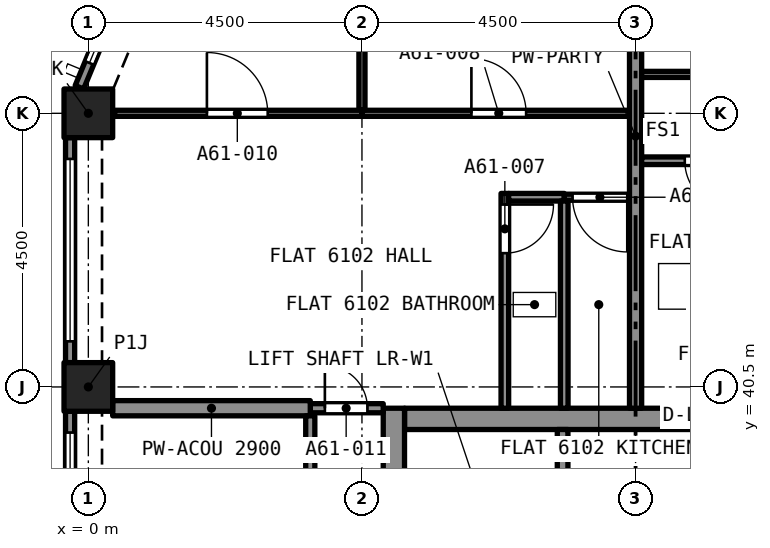
"""IFC4 building model, lengths in metres.
Left out: names, types, materials, properties, quantities, classifications, styles, units other than length and angle.
Written with IfcOpenShell. Run it as: python <this file> out.ifc"""

import sys

from ifc_helpers import new_model, si_unit, direction, frame, frame_2d, origin, origin_2d, place, context, subcontext, project, spatial, rectangle, extrude, element, fill, save


model = new_model("IFC4")
c1 = context("Model", 3, precision=1e-05, world=origin(), true_north=direction((0.0, 1.0)))
c2 = subcontext(c1, "Body", "Model", "MODEL_VIEW")
j1 = project(units=[si_unit("LENGTHUNIT", "METRE"), si_unit("PLANEANGLEUNIT", "RADIAN")], contexts=[c1])
p1 = place(None, origin())
s1 = spatial("IfcSite", under=j1, at=p1, CompositionType="ELEMENT")
p2 = place(p1, origin())
s2 = spatial("IfcBuilding", under=s1, at=p2, CompositionType="ELEMENT")
p3 = place(p2, frame((0.0, 0.0, 219.695)))
s3 = spatial("IfcBuildingStorey", under=s2, at=p3, CompositionType="ELEMENT", Elevation=219.695)
for number, where, z_axis, x_axis in (
    (1, (0.0, 40.5, 0.0), (0.0, 0.0, 1.0), (1.0, 0.0, 0.0)),
    (2, (0.0, 45.0, 0.0), (0.0, 0.0, 1.0), (1.0, 0.0, 0.0)),
):
    element("IfcColumn", number, at=place(p3, frame(where, z_axis=z_axis, x_axis=x_axis)), inside=s3, PredefinedType="COLUMN", context=c2, shape_type="SweptSolid", body=[
        extrude(rectangle(XDim=0.8, YDim=0.8, at=origin_2d()), origin(), (0.0, 0.0, 1.0), 3.2),
    ])
p4 = place(p3, frame((5.2, 39.975, 0.0), z_axis=(0.0, 0.0, 1.0), x_axis=(1.0, 0.0, 0.0)))
e3 = element("IfcWall", 3, at=p4, inside=s3, PredefinedType="SOLIDWALL", context=c2, shape_type="SweptSolid", body=[
    extrude(rectangle(XDim=7.6, YDim=0.35, at=frame_2d((3.8, 0.0))), origin(), (0.0, 0.0, 1.0), 3.2),
])
p5 = place(p3, frame((5.025, 27.35, 0.0), z_axis=(0.0, 0.0, 1.0), x_axis=(0.0, 1.0, 0.0)))
e4 = element("IfcWall", 4, at=p5, inside=s3, PredefinedType="SOLIDWALL", context=c2, shape_type="SweptSolid", body=[
    extrude(rectangle(XDim=12.8, YDim=0.35, at=frame_2d((6.4, 0.0))), origin(), (0.0, 0.0, 1.0), 3.2),
])
p6 = place(p5, frame((8.6, 0.0, 0.0)))
e5 = element("IfcOpeningElement", 5, at=p6, cuts=e4, PredefinedType="OPENING", context=c2, shape_type="SweptSolid", body=[
    extrude(rectangle(XDim=1.2, YDim=2.1, at=frame_2d((0.6, 1.05))), frame((0.0, 0.185, 0.0), z_axis=(0.0, -1.0, 0.0), x_axis=(1.0, 0.0, 0.0)), (0.0, 0.0, 1.0), 0.37),
])
p7 = place(p3, frame((-0.147, 45.429, 0.0), z_axis=(0.0, 0.0, 1.0), x_axis=(0.382669406082, 0.923885342263, 0.0)))
e6 = element("IfcWall", 6, at=p7, inside=s3, PredefinedType="SOLIDWALL", context=c2, shape_type="SweptSolid", body=[
    extrude(rectangle(XDim=2.602, YDim=0.15, at=frame_2d((1.301, 0.0))), origin(), (0.0, 0.0, 1.0), 3.2),
])
p8 = place(p7, frame((0.432, 0.0, 0.45)))
e7 = element("IfcOpeningElement", 7, at=p8, cuts=e6, PredefinedType="OPENING", context=c2, shape_type="SweptSolid", body=[
    extrude(rectangle(XDim=1.9, YDim=1.95, at=frame_2d((0.95, 0.975))), frame((0.0, 0.085, 0.0), z_axis=(0.0, -1.0, 0.0), x_axis=(1.0, 0.0, 0.0)), (0.0, 0.0, 1.0), 0.17),
])
p9 = place(p3, frame((-0.3, 40.9, 0.0), z_axis=(0.0, 0.0, 1.0), x_axis=(0.0, 1.0, 0.0)))
e8 = element("IfcWall", 8, at=p9, inside=s3, PredefinedType="SOLIDWALL", context=c2, shape_type="SweptSolid", body=[
    extrude(rectangle(XDim=3.7, YDim=0.15, at=frame_2d((1.85, 0.0))), origin(), (0.0, 0.0, 1.0), 3.2),
])
p10 = place(p9, frame((0.35, 0.0, 0.45)))
e9 = element("IfcOpeningElement", 9, at=p10, cuts=e8, PredefinedType="OPENING", context=c2, shape_type="SweptSolid", body=[
    extrude(rectangle(XDim=3.0, YDim=1.95, at=frame_2d((1.5, 0.975))), frame((0.0, 0.085, 0.0), z_axis=(0.0, -1.0, 0.0), x_axis=(1.0, 0.0, 0.0)), (0.0, 0.0, 1.0), 0.17),
])
p11 = place(p3, frame((-0.3, 36.4, 0.0), z_axis=(0.0, 0.0, 1.0), x_axis=(0.0, 1.0, 0.0)))
e10 = element("IfcWall", 10, at=p11, inside=s3, PredefinedType="SOLIDWALL", context=c2, shape_type="SweptSolid", body=[
    extrude(rectangle(XDim=3.7, YDim=0.15, at=frame_2d((1.85, 0.0))), origin(), (0.0, 0.0, 1.0), 3.2),
])
p12 = place(p11, frame((0.35, 0.0, 0.45)))
e11 = element("IfcOpeningElement", 11, at=p12, cuts=e10, PredefinedType="OPENING", context=c2, shape_type="SweptSolid", body=[
    extrude(rectangle(XDim=3.0, YDim=1.95, at=frame_2d((1.5, 0.975))), frame((0.0, 0.085, 0.0), z_axis=(0.0, -1.0, 0.0), x_axis=(1.0, 0.0, 0.0)), (0.0, 0.0, 1.0), 0.17),
])
p13 = place(p3, frame((6.85, 43.683, 0.0), z_axis=(0.0, 0.0, 1.0), x_axis=(0.0, -1.0, 0.0)))
e12 = element("IfcWall", 12, at=p13, inside=s3, PredefinedType="PARTITIONING", context=c2, shape_type="SweptSolid", body=[
    extrude(rectangle(XDim=3.533, YDim=0.125, at=frame_2d((1.766, 0.0))), origin(), (0.0, 0.0, 1.0), 2.9),
])
p14 = place(p13, frame((0.183, 0.0, 0.0)))
e13 = element("IfcOpeningElement", 13, at=p14, cuts=e12, PredefinedType="OPENING", context=c2, shape_type="SweptSolid", body=[
    extrude(rectangle(XDim=0.8, YDim=2.1, at=frame_2d((0.4, 1.05))), frame((0.0, 0.073, 0.0), z_axis=(0.0, -1.0, 0.0), x_axis=(1.0, 0.0, 0.0)), (0.0, 0.0, 1.0), 0.145),
])
p15 = place(p3, frame((6.913, 43.62, 0.0), z_axis=(0.0, 0.0, 1.0), x_axis=(1.0, 0.0, 0.0)))
e14 = element("IfcWall", 14, at=p15, inside=s3, PredefinedType="PARTITIONING", context=c2, shape_type="SweptSolid", body=[
    extrude(rectangle(XDim=0.915, YDim=0.125, at=frame_2d((0.458, 0.0))), origin(), (0.0, 0.0, 1.0), 2.9),
])
p16 = place(p3, frame((7.827, 40.15, 0.0), z_axis=(0.0, 0.0, 1.0), x_axis=(0.0, 1.0, 0.0)))
e15 = element("IfcWall", 15, at=p16, inside=s3, PredefinedType="PARTITIONING", context=c2, shape_type="SweptSolid", body=[
    extrude(rectangle(XDim=3.408, YDim=0.125, at=frame_2d((1.704, 0.0))), origin(), (0.0, 0.0, 1.0), 2.9),
])
p17 = place(p3, frame((4.5, 45.0, 0.0), z_axis=(0.0, 0.0, 1.0), x_axis=(1.0, 0.0, 0.0)))
e16 = element("IfcWall", 16, at=p17, inside=s3, PredefinedType="PARTITIONING", context=c2, shape_type="SweptSolid", body=[
    extrude(rectangle(XDim=4.4, YDim=0.1, at=frame_2d((2.2, 0.0))), origin(), (0.0, 0.0, 1.0), 2.9),
])
p18 = place(p17, frame((1.8, 0.0, 0.0)))
e17 = element("IfcOpeningElement", 17, at=p18, cuts=e16, PredefinedType="OPENING", context=c2, shape_type="SweptSolid", body=[
    extrude(rectangle(XDim=0.9, YDim=2.1, at=frame_2d((0.45, 1.05))), frame((0.0, 0.06, 0.0), z_axis=(0.0, -1.0, 0.0), x_axis=(1.0, 0.0, 0.0)), (0.0, 0.0, 1.0), 0.12),
])
p19 = place(p3, frame((4.5, 45.05, 0.0), z_axis=(0.0, 0.0, 1.0), x_axis=(0.0, 1.0, 0.0)))
e18 = element("IfcWall", 18, at=p19, inside=s3, PredefinedType="PARTITIONING", context=c2, shape_type="SweptSolid", body=[
    extrude(rectangle(XDim=4.017, YDim=0.1, at=frame_2d((2.009, 0.0))), origin(), (0.0, 0.0, 1.0), 2.9),
])
p20 = place(p3, frame((8.9, 43.62, 0.0), z_axis=(0.0, 0.0, 1.0), x_axis=(-1.0, 0.0, 0.0)))
e19 = element("IfcWall", 19, at=p20, inside=s3, PredefinedType="PARTITIONING", context=c2, shape_type="SweptSolid", body=[
    extrude(rectangle(XDim=1.073, YDim=0.1, at=frame_2d((0.536, 0.0))), origin(), (0.0, 0.0, 1.0), 2.9),
])
p21 = place(p20, frame((0.036, 0.0, 0.0)))
e20 = element("IfcOpeningElement", 20, at=p21, cuts=e19, PredefinedType="OPENING", context=c2, shape_type="SweptSolid", body=[
    extrude(rectangle(XDim=0.9, YDim=2.1, at=frame_2d((0.45, 1.05))), frame((0.0, 0.06, 0.0), z_axis=(0.0, -1.0, 0.0), x_axis=(1.0, 0.0, 0.0)), (0.0, 0.0, 1.0), 0.12),
])
p22 = place(p3, frame((0.433, 45.0, 0.0), z_axis=(0.0, 0.0, 1.0), x_axis=(1.0, 0.0, 0.0)))
e21 = element("IfcWall", 21, at=p22, inside=s3, PredefinedType="PARTITIONING", context=c2, shape_type="SweptSolid", body=[
    extrude(rectangle(XDim=4.067, YDim=0.1, at=frame_2d((2.034, 0.0))), origin(), (0.0, 0.0, 1.0), 2.9),
])
p23 = place(p22, frame((1.517, 0.0, 0.0)))
e22 = element("IfcOpeningElement", 22, at=p23, cuts=e21, PredefinedType="OPENING", context=c2, shape_type="SweptSolid", body=[
    extrude(rectangle(XDim=1.0, YDim=2.1, at=frame_2d((0.5, 1.05))), frame((0.0, 0.06, 0.0), z_axis=(0.0, -1.0, 0.0), x_axis=(1.0, 0.0, 0.0)), (0.0, 0.0, 1.0), 0.12),
])
p24 = place(p3, frame((3.65, 40.15, 0.0), z_axis=(0.0, 0.0, 1.0), x_axis=(1.0, 0.0, 0.0)))
e23 = element("IfcWall", 23, at=p24, inside=s3, PredefinedType="PARTITIONING", context=c2, shape_type="SweptSolid", body=[
    extrude(rectangle(XDim=1.2, YDim=0.15, at=frame_2d((0.6, 0.0))), origin(), (0.0, 0.0, 1.0), 2.9),
])
p25 = place(p24, frame((0.24, 0.0, 0.0)))
e24 = element("IfcOpeningElement", 24, at=p25, cuts=e23, PredefinedType="OPENING", context=c2, shape_type="SweptSolid", body=[
    extrude(rectangle(XDim=0.7, YDim=2.1, at=frame_2d((0.35, 1.05))), frame((0.0, 0.085, 0.0), z_axis=(0.0, -1.0, 0.0), x_axis=(1.0, 0.0, 0.0)), (0.0, 0.0, 1.0), 0.17),
])
p26 = place(p3, frame((0.4, 40.15, 0.0), z_axis=(0.0, 0.0, 1.0), x_axis=(1.0, 0.0, 0.0)))
e25 = element("IfcWall", 25, at=p26, inside=s3, PredefinedType="PARTITIONING", context=c2, shape_type="SweptSolid", body=[
    extrude(rectangle(XDim=3.25, YDim=0.25, at=frame_2d((1.625, 0.0))), origin(), (0.0, 0.0, 1.0), 2.9),
])
p27 = place(p3, frame((9.0, 40.15, 0.0), z_axis=(0.0, 0.0, 1.0), x_axis=(0.0, 1.0, 0.0)))
e26 = element("IfcWall", 26, at=p27, inside=s3, PredefinedType="PARTITIONING", context=c2, shape_type="SweptSolid", body=[
    extrude(rectangle(XDim=8.95, YDim=0.2, at=frame_2d((4.475, 0.0))), origin(), (0.0, 0.0, 1.0), 2.9),
])
p28 = place(p3, frame((11.418, 44.22, 0.0), z_axis=(0.0, 0.0, 1.0), x_axis=(-1.0, 0.0, 0.0)))
e27 = element("IfcWall", 27, at=p28, inside=s3, PredefinedType="PARTITIONING", context=c2, shape_type="SweptSolid", body=[
    extrude(rectangle(XDim=2.318, YDim=0.125, at=frame_2d((1.159, 0.0))), origin(), (0.0, 0.0, 1.0), 2.9),
])
p29 = place(p28, frame((0.809, 0.0, 0.0)))
e28 = element("IfcOpeningElement", 28, at=p29, cuts=e27, PredefinedType="OPENING", context=c2, shape_type="SweptSolid", body=[
    extrude(rectangle(XDim=0.8, YDim=2.1, at=frame_2d((0.4, 1.05))), frame((0.0, 0.073, 0.0), z_axis=(0.0, -1.0, 0.0), x_axis=(1.0, 0.0, 0.0)), (0.0, 0.0, 1.0), 0.145),
])
p30 = place(p3, frame((9.1, 45.64, 0.0), z_axis=(0.0, 0.0, 1.0), x_axis=(1.0, 0.0, 0.0)))
e29 = element("IfcWall", 29, at=p30, inside=s3, PredefinedType="PARTITIONING", context=c2, shape_type="SweptSolid", body=[
    extrude(rectangle(XDim=4.4, YDim=0.1, at=frame_2d((2.2, 0.0))), origin(), (0.0, 0.0, 1.0), 2.9),
])
p31 = place(p30, frame((1.65, 0.0, 0.0)))
e30 = element("IfcOpeningElement", 30, at=p31, cuts=e29, PredefinedType="OPENING", context=c2, shape_type="SweptSolid", body=[
    extrude(rectangle(XDim=1.0, YDim=2.1, at=frame_2d((0.5, 1.05))), frame((0.0, 0.06, 0.0), z_axis=(0.0, -1.0, 0.0), x_axis=(1.0, 0.0, 0.0)), (0.0, 0.0, 1.0), 0.12),
])
p32 = place(p3, frame((3.65, 36.0, 0.0), z_axis=(0.0, 0.0, 1.0), x_axis=(0.0, 1.0, 0.0)))
e31 = element("IfcWall", 31, at=p32, inside=s3, PredefinedType="PARTITIONING", context=c2, shape_type="SweptSolid", body=[
    extrude(rectangle(XDim=4.025, YDim=0.15, at=frame_2d((2.012, 0.0))), origin(), (0.0, 0.0, 1.0), 2.9),
])
p33 = place(p32, frame((1.575, 0.0, 0.0)))
e32 = element("IfcOpeningElement", 32, at=p33, cuts=e31, PredefinedType="OPENING", context=c2, shape_type="SweptSolid", body=[
    extrude(rectangle(XDim=1.0, YDim=2.1, at=frame_2d((0.5, 1.05))), frame((0.0, 0.085, 0.0), z_axis=(0.0, -1.0, 0.0), x_axis=(1.0, 0.0, 0.0)), (0.0, 0.0, 1.0), 0.17),
])
p34 = place(p3, frame((7.8, 37.5, 0.0), z_axis=(0.0, 0.0, 1.0), x_axis=(0.0, 1.0, 0.0)))
e33 = element("IfcWall", 33, at=p34, inside=s3, PredefinedType="SOLIDWALL", context=c2, shape_type="SweptSolid", body=[
    extrude(rectangle(XDim=2.3, YDim=0.175, at=frame_2d((1.15, 0.0))), origin(), (0.0, 0.0, 1.0), 2.9),
])
p35 = place(p8, origin())
e34 = element("IfcWindow", 34, at=p35, inside=s3, PartitioningType="SINGLE_PANEL", PredefinedType="WINDOW", context=c2, shape_type="SweptSolid", body=[
    extrude(rectangle(XDim=1.9, YDim=1.95, at=frame_2d((0.95, 0.975))), frame((0.0, 0.03, 0.0), z_axis=(0.0, -1.0, 0.0), x_axis=(1.0, 0.0, 0.0)), (0.0, 0.0, 1.0), 0.06),
])
fill(e7, e34)
p36 = place(p10, origin())
e35 = element("IfcWindow", 35, at=p36, inside=s3, PartitioningType="SINGLE_PANEL", PredefinedType="WINDOW", context=c2, shape_type="SweptSolid", body=[
    extrude(rectangle(XDim=3.0, YDim=1.95, at=frame_2d((1.5, 0.975))), frame((0.0, 0.03, 0.0), z_axis=(0.0, -1.0, 0.0), x_axis=(1.0, 0.0, 0.0)), (0.0, 0.0, 1.0), 0.06),
])
fill(e9, e35)
p37 = place(p12, origin())
e36 = element("IfcWindow", 36, at=p37, inside=s3, PartitioningType="SINGLE_PANEL", PredefinedType="WINDOW", context=c2, shape_type="SweptSolid", body=[
    extrude(rectangle(XDim=3.0, YDim=1.95, at=frame_2d((1.5, 0.975))), frame((0.0, 0.03, 0.0), z_axis=(0.0, -1.0, 0.0), x_axis=(1.0, 0.0, 0.0)), (0.0, 0.0, 1.0), 0.06),
])
fill(e11, e36)
p38 = place(p14, origin())
e37 = element("IfcDoor", 37, at=p38, inside=s3, OperationType="SINGLE_SWING_LEFT", PredefinedType="DOOR", context=c2, shape_type="SweptSolid", body=[
    extrude(rectangle(XDim=0.8, YDim=2.1, at=frame_2d((0.4, 1.05))), frame((0.0, 0.025, 0.0), z_axis=(0.0, -1.0, 0.0), x_axis=(1.0, 0.0, 0.0)), (0.0, 0.0, 1.0), 0.05),
])
fill(e13, e37)
p39 = place(p18, origin())
e38 = element("IfcDoor", 38, at=p39, inside=s3, OperationType="SINGLE_SWING_RIGHT", PredefinedType="DOOR", context=c2, shape_type="SweptSolid", body=[
    extrude(rectangle(XDim=0.9, YDim=2.1, at=frame_2d((0.45, 1.05))), frame((0.0, 0.025, 0.0), z_axis=(0.0, -1.0, 0.0), x_axis=(1.0, 0.0, 0.0)), (0.0, 0.0, 1.0), 0.05),
])
fill(e17, e38)
p40 = place(p21, origin())
e39 = element("IfcDoor", 39, at=p40, inside=s3, OperationType="SINGLE_SWING_LEFT", PredefinedType="DOOR", context=c2, shape_type="SweptSolid", body=[
    extrude(rectangle(XDim=0.9, YDim=2.1, at=frame_2d((0.45, 1.05))), frame((0.0, 0.025, 0.0), z_axis=(0.0, -1.0, 0.0), x_axis=(1.0, 0.0, 0.0)), (0.0, 0.0, 1.0), 0.05),
])
fill(e20, e39)
p41 = place(p23, origin())
e40 = element("IfcDoor", 40, at=p41, inside=s3, OperationType="SINGLE_SWING_LEFT", PredefinedType="DOOR", context=c2, shape_type="SweptSolid", body=[
    extrude(rectangle(XDim=1.0, YDim=2.1, at=frame_2d((0.5, 1.05))), frame((0.0, 0.025, 0.0), z_axis=(0.0, -1.0, 0.0), x_axis=(1.0, 0.0, 0.0)), (0.0, 0.0, 1.0), 0.05),
])
fill(e22, e40)
p42 = place(p25, origin())
e41 = element("IfcDoor", 41, at=p42, inside=s3, OperationType="SINGLE_SWING_LEFT", PredefinedType="DOOR", context=c2, shape_type="SweptSolid", body=[
    extrude(rectangle(XDim=0.7, YDim=2.1, at=frame_2d((0.35, 1.05))), frame((0.0, 0.025, 0.0), z_axis=(0.0, -1.0, 0.0), x_axis=(1.0, 0.0, 0.0)), (0.0, 0.0, 1.0), 0.05),
])
fill(e24, e41)
p43 = place(p29, origin())
e42 = element("IfcDoor", 42, at=p43, inside=s3, OperationType="SINGLE_SWING_RIGHT", PredefinedType="DOOR", context=c2, shape_type="SweptSolid", body=[
    extrude(rectangle(XDim=0.8, YDim=2.1, at=frame_2d((0.4, 1.05))), frame((0.0, 0.025, 0.0), z_axis=(0.0, -1.0, 0.0), x_axis=(1.0, 0.0, 0.0)), (0.0, 0.0, 1.0), 0.05),
])
fill(e28, e42)
save(model, sys.argv[1])
